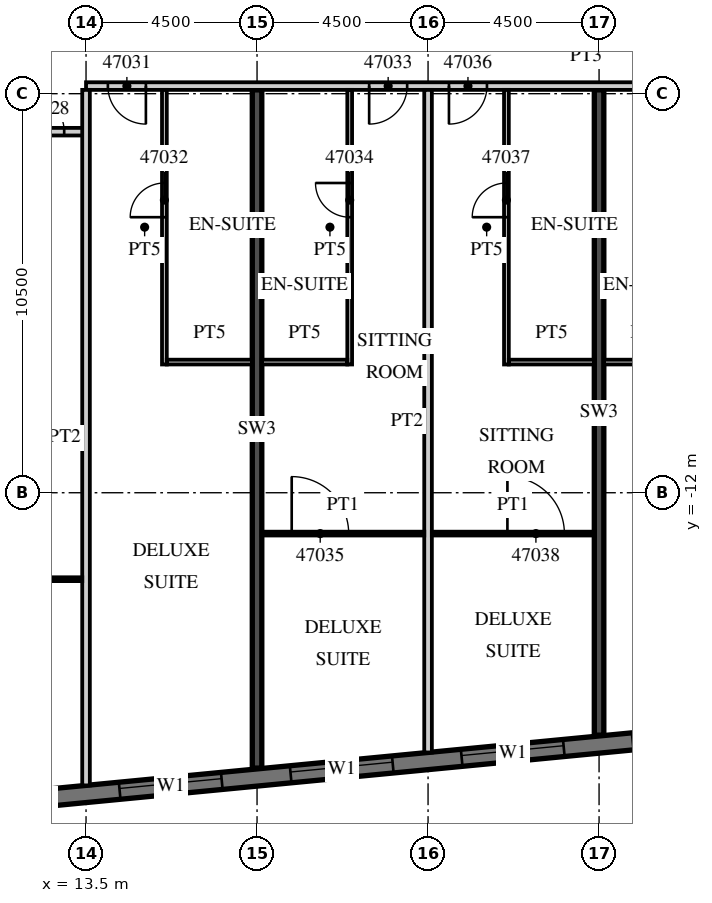
"""IFC4 building model, lengths in metres.
Left out: names, types, materials, properties, quantities, classifications, styles, units other than length and angle.
Written with IfcOpenShell. Run it as: python <this file> out.ifc"""

import sys

from ifc_helpers import new_model, si_unit, direction, frame, frame_2d, origin, place, context, subcontext, project, spatial, rectangle, extrude, element, fill, save


model = new_model("IFC4")
c1 = context("Model", 3, precision=1e-05, world=origin(), true_north=direction((0.0, 1.0)))
c2 = subcontext(c1, "Body", "Model", "MODEL_VIEW")
j1 = project(units=[si_unit("LENGTHUNIT", "METRE"), si_unit("PLANEANGLEUNIT", "RADIAN")], contexts=[c1])
p1 = place(None, origin())
s1 = spatial("IfcSite", under=j1, at=p1, CompositionType="ELEMENT")
p2 = place(p1, origin())
s2 = spatial("IfcBuilding", under=s1, at=p2, CompositionType="ELEMENT")
p3 = place(p2, frame((0.0, 0.0, 196.6)))
s3 = spatial("IfcBuildingStorey", under=s2, at=p3, CompositionType="ELEMENT", Elevation=196.6)
p4 = place(p3, frame((18.0, -19.245, 0.0), z_axis=(0.0, 0.0, 1.0), x_axis=(0.0, 1.0, 0.0)))
e1 = element("IfcWall", 1, at=p4, inside=s3, PredefinedType="SHEAR", context=c2, shape_type="SweptSolid", body=[
    extrude(rectangle(XDim=17.845, YDim=0.25, at=frame_2d((8.923, 0.0))), origin(), (0.0, 0.0, 1.0), 3.3),
])
p5 = place(p3, frame((27.0, -18.379, 0.0), z_axis=(0.0, 0.0, 1.0), x_axis=(0.0, 1.0, 0.0)))
e2 = element("IfcWall", 2, at=p5, inside=s3, PredefinedType="SHEAR", context=c2, shape_type="SweptSolid", body=[
    extrude(rectangle(XDim=16.979, YDim=0.25, at=frame_2d((8.489, 0.0))), origin(), (0.0, 0.0, 1.0), 3.3),
])
p6 = place(p3, frame((-13.521, -22.529, 0.0), z_axis=(0.0, 0.0, 1.0), x_axis=(0.995396436651, 0.095843277819, 0.0)))
e3 = element("IfcWall", 3, at=p6, inside=s3, PredefinedType="SOLIDWALL", context=c2, shape_type="SweptSolid", body=[
    extrude(rectangle(XDim=51.578, YDim=0.45, at=frame_2d((25.789, 0.0))), origin(), (0.0, 0.0, 1.0), 3.02),
])
p7 = place(p6, frame((0.91, 0.0, 0.45)))
e4 = element("IfcOpeningElement", 4, at=p7, cuts=e3, PredefinedType="OPENING", context=c2, shape_type="SweptSolid", body=[
    extrude(rectangle(XDim=2.7, YDim=2.25, at=frame_2d((1.35, 1.125))), frame((0.0, 0.235, 0.0), z_axis=(0.0, -1.0, 0.0), x_axis=(1.0, 0.0, 0.0)), (0.0, 0.0, 1.0), 0.47),
])
p8 = place(p6, frame((5.431, 0.0, 0.45)))
e5 = element("IfcOpeningElement", 5, at=p8, cuts=e3, PredefinedType="OPENING", context=c2, shape_type="SweptSolid", body=[
    extrude(rectangle(XDim=2.7, YDim=2.25, at=frame_2d((1.35, 1.125))), frame((0.0, 0.235, 0.0), z_axis=(0.0, -1.0, 0.0), x_axis=(1.0, 0.0, 0.0)), (0.0, 0.0, 1.0), 0.47),
])
p9 = place(p6, frame((9.952, 0.0, 0.45)))
e6 = element("IfcOpeningElement", 6, at=p9, cuts=e3, PredefinedType="OPENING", context=c2, shape_type="SweptSolid", body=[
    extrude(rectangle(XDim=2.7, YDim=2.25, at=frame_2d((1.35, 1.125))), frame((0.0, 0.235, 0.0), z_axis=(0.0, -1.0, 0.0), x_axis=(1.0, 0.0, 0.0)), (0.0, 0.0, 1.0), 0.47),
])
p10 = place(p6, frame((14.473, 0.0, 0.45)))
e7 = element("IfcOpeningElement", 7, at=p10, cuts=e3, PredefinedType="OPENING", context=c2, shape_type="SweptSolid", body=[
    extrude(rectangle(XDim=2.7, YDim=2.25, at=frame_2d((1.35, 1.125))), frame((0.0, 0.235, 0.0), z_axis=(0.0, -1.0, 0.0), x_axis=(1.0, 0.0, 0.0)), (0.0, 0.0, 1.0), 0.47),
])
p11 = place(p6, frame((18.994, 0.0, 0.45)))
e8 = element("IfcOpeningElement", 8, at=p11, cuts=e3, PredefinedType="OPENING", context=c2, shape_type="SweptSolid", body=[
    extrude(rectangle(XDim=2.7, YDim=2.25, at=frame_2d((1.35, 1.125))), frame((0.0, 0.235, 0.0), z_axis=(0.0, -1.0, 0.0), x_axis=(1.0, 0.0, 0.0)), (0.0, 0.0, 1.0), 0.47),
])
p12 = place(p6, frame((23.514, 0.0, 0.45)))
e9 = element("IfcOpeningElement", 9, at=p12, cuts=e3, PredefinedType="OPENING", context=c2, shape_type="SweptSolid", body=[
    extrude(rectangle(XDim=2.7, YDim=2.25, at=frame_2d((1.35, 1.125))), frame((0.0, 0.235, 0.0), z_axis=(0.0, -1.0, 0.0), x_axis=(1.0, 0.0, 0.0)), (0.0, 0.0, 1.0), 0.47),
])
p13 = place(p6, frame((28.035, 0.0, 0.45)))
e10 = element("IfcOpeningElement", 10, at=p13, cuts=e3, PredefinedType="OPENING", context=c2, shape_type="SweptSolid", body=[
    extrude(rectangle(XDim=2.7, YDim=2.25, at=frame_2d((1.35, 1.125))), frame((0.0, 0.235, 0.0), z_axis=(0.0, -1.0, 0.0), x_axis=(1.0, 0.0, 0.0)), (0.0, 0.0, 1.0), 0.47),
])
p14 = place(p6, frame((32.556, 0.0, 0.45)))
e11 = element("IfcOpeningElement", 11, at=p14, cuts=e3, PredefinedType="OPENING", context=c2, shape_type="SweptSolid", body=[
    extrude(rectangle(XDim=2.7, YDim=2.25, at=frame_2d((1.35, 1.125))), frame((0.0, 0.235, 0.0), z_axis=(0.0, -1.0, 0.0), x_axis=(1.0, 0.0, 0.0)), (0.0, 0.0, 1.0), 0.47),
])
p15 = place(p6, frame((37.077, 0.0, 0.45)))
e12 = element("IfcOpeningElement", 12, at=p15, cuts=e3, PredefinedType="OPENING", context=c2, shape_type="SweptSolid", body=[
    extrude(rectangle(XDim=2.7, YDim=2.25, at=frame_2d((1.35, 1.125))), frame((0.0, 0.235, 0.0), z_axis=(0.0, -1.0, 0.0), x_axis=(1.0, 0.0, 0.0)), (0.0, 0.0, 1.0), 0.47),
])
p16 = place(p6, frame((41.598, 0.0, 0.45)))
e13 = element("IfcOpeningElement", 13, at=p16, cuts=e3, PredefinedType="OPENING", context=c2, shape_type="SweptSolid", body=[
    extrude(rectangle(XDim=2.7, YDim=2.25, at=frame_2d((1.35, 1.125))), frame((0.0, 0.235, 0.0), z_axis=(0.0, -1.0, 0.0), x_axis=(1.0, 0.0, 0.0)), (0.0, 0.0, 1.0), 0.47),
])
p17 = place(p6, frame((46.119, 0.0, 0.45)))
e14 = element("IfcOpeningElement", 14, at=p17, cuts=e3, PredefinedType="OPENING", context=c2, shape_type="SweptSolid", body=[
    extrude(rectangle(XDim=2.7, YDim=2.25, at=frame_2d((1.35, 1.125))), frame((0.0, 0.235, 0.0), z_axis=(0.0, -1.0, 0.0), x_axis=(1.0, 0.0, 0.0)), (0.0, 0.0, 1.0), 0.47),
])
p18 = place(p3, frame((-13.5, -2.5, 0.0), z_axis=(0.0, 0.0, 1.0), x_axis=(1.0, 0.0, 0.0)))
e15 = element("IfcWall", 15, at=p18, inside=s3, PredefinedType="PARTITIONING", context=c2, shape_type="SweptSolid", body=[
    extrude(rectangle(XDim=27.0, YDim=0.2, at=frame_2d((13.5, 0.0))), origin(), (0.0, 0.0, 1.0), 3.02),
])
p19 = place(p18, frame((2.925, 0.0, 0.0)))
e16 = element("IfcOpeningElement", 16, at=p19, cuts=e15, PredefinedType="OPENING", context=c2, shape_type="SweptSolid", body=[
    extrude(rectangle(XDim=1.0, YDim=2.1, at=frame_2d((0.5, 1.05))), frame((0.0, 0.11, 0.0), z_axis=(0.0, -1.0, 0.0), x_axis=(1.0, 0.0, 0.0)), (0.0, 0.0, 1.0), 0.22),
])
p20 = place(p18, frame((5.075, 0.0, 0.0)))
e17 = element("IfcOpeningElement", 17, at=p20, cuts=e15, PredefinedType="OPENING", context=c2, shape_type="SweptSolid", body=[
    extrude(rectangle(XDim=1.0, YDim=2.1, at=frame_2d((0.5, 1.05))), frame((0.0, 0.11, 0.0), z_axis=(0.0, -1.0, 0.0), x_axis=(1.0, 0.0, 0.0)), (0.0, 0.0, 1.0), 0.22),
])
p21 = place(p18, frame((11.925, 0.0, 0.0)))
e18 = element("IfcOpeningElement", 18, at=p21, cuts=e15, PredefinedType="OPENING", context=c2, shape_type="SweptSolid", body=[
    extrude(rectangle(XDim=1.0, YDim=2.1, at=frame_2d((0.5, 1.05))), frame((0.0, 0.11, 0.0), z_axis=(0.0, -1.0, 0.0), x_axis=(1.0, 0.0, 0.0)), (0.0, 0.0, 1.0), 0.22),
])
p22 = place(p18, frame((15.938, 0.0, 0.0)))
e19 = element("IfcOpeningElement", 19, at=p22, cuts=e15, PredefinedType="OPENING", context=c2, shape_type="SweptSolid", body=[
    extrude(rectangle(XDim=1.2, YDim=2.1, at=frame_2d((0.6, 1.05))), frame((0.0, 0.11, 0.0), z_axis=(0.0, -1.0, 0.0), x_axis=(1.0, 0.0, 0.0)), (0.0, 0.0, 1.0), 0.22),
])
p23 = place(p18, frame((25.425, 0.0, 0.0)))
e20 = element("IfcOpeningElement", 20, at=p23, cuts=e15, PredefinedType="OPENING", context=c2, shape_type="SweptSolid", body=[
    extrude(rectangle(XDim=1.0, YDim=2.1, at=frame_2d((0.5, 1.05))), frame((0.0, 0.11, 0.0), z_axis=(0.0, -1.0, 0.0), x_axis=(1.0, 0.0, 0.0)), (0.0, 0.0, 1.0), 0.22),
])
p24 = place(p3, frame((13.5, -1.3, 0.0), z_axis=(0.0, 0.0, 1.0), x_axis=(1.0, 0.0, 0.0)))
e21 = element("IfcWall", 21, at=p24, inside=s3, PredefinedType="PARTITIONING", context=c2, shape_type="SweptSolid", body=[
    extrude(rectangle(XDim=26.317, YDim=0.2, at=frame_2d((13.158, 0.0))), origin(), (0.0, 0.0, 1.0), 3.02),
])
p25 = place(p24, frame((0.575, 0.0, 0.0)))
e22 = element("IfcOpeningElement", 22, at=p25, cuts=e21, PredefinedType="OPENING", context=c2, shape_type="SweptSolid", body=[
    extrude(rectangle(XDim=1.0, YDim=2.1, at=frame_2d((0.5, 1.05))), frame((0.0, 0.11, 0.0), z_axis=(0.0, -1.0, 0.0), x_axis=(1.0, 0.0, 0.0)), (0.0, 0.0, 1.0), 0.22),
])
p26 = place(p24, frame((7.45, 0.0, 0.0)))
e23 = element("IfcOpeningElement", 23, at=p26, cuts=e21, PredefinedType="OPENING", context=c2, shape_type="SweptSolid", body=[
    extrude(rectangle(XDim=1.0, YDim=2.1, at=frame_2d((0.5, 1.05))), frame((0.0, 0.11, 0.0), z_axis=(0.0, -1.0, 0.0), x_axis=(1.0, 0.0, 0.0)), (0.0, 0.0, 1.0), 0.22),
])
p27 = place(p24, frame((9.55, 0.0, 0.0)))
e24 = element("IfcOpeningElement", 24, at=p27, cuts=e21, PredefinedType="OPENING", context=c2, shape_type="SweptSolid", body=[
    extrude(rectangle(XDim=1.0, YDim=2.1, at=frame_2d((0.5, 1.05))), frame((0.0, 0.11, 0.0), z_axis=(0.0, -1.0, 0.0), x_axis=(1.0, 0.0, 0.0)), (0.0, 0.0, 1.0), 0.22),
])
p28 = place(p24, frame((16.45, 0.0, 0.0)))
e25 = element("IfcOpeningElement", 25, at=p28, cuts=e21, PredefinedType="OPENING", context=c2, shape_type="SweptSolid", body=[
    extrude(rectangle(XDim=1.0, YDim=2.1, at=frame_2d((0.5, 1.05))), frame((0.0, 0.11, 0.0), z_axis=(0.0, -1.0, 0.0), x_axis=(1.0, 0.0, 0.0)), (0.0, 0.0, 1.0), 0.22),
])
p29 = place(p24, frame((20.925, 0.0, 0.0)))
e26 = element("IfcOpeningElement", 26, at=p29, cuts=e21, PredefinedType="OPENING", context=c2, shape_type="SweptSolid", body=[
    extrude(rectangle(XDim=1.0, YDim=2.1, at=frame_2d((0.5, 1.05))), frame((0.0, 0.11, 0.0), z_axis=(0.0, -1.0, 0.0), x_axis=(1.0, 0.0, 0.0)), (0.0, 0.0, 1.0), 0.22),
])
p30 = place(p24, frame((25.267, 0.0, 0.0)))
e27 = element("IfcOpeningElement", 27, at=p30, cuts=e21, PredefinedType="OPENING", context=c2, shape_type="SweptSolid", body=[
    extrude(rectangle(XDim=0.9, YDim=2.1, at=frame_2d((0.45, 1.05))), frame((0.0, 0.11, 0.0), z_axis=(0.0, -1.0, 0.0), x_axis=(1.0, 0.0, 0.0)), (0.0, 0.0, 1.0), 0.22),
])
p31 = place(p3, frame((13.5, -19.701, 0.0), z_axis=(0.0, 0.0, 1.0), x_axis=(0.0, 1.0, 0.0)))
e28 = element("IfcWall", 28, at=p31, inside=s3, PredefinedType="PARTITIONING", context=c2, shape_type="SweptSolid", body=[
    extrude(rectangle(XDim=18.301, YDim=0.2, at=frame_2d((9.15, 0.0))), origin(), (0.0, 0.0, 1.0), 3.02),
])
p32 = place(p3, frame((9.125, -14.275, 0.0), z_axis=(0.0, 0.0, 1.0), x_axis=(1.0, 0.0, 0.0)))
e29 = element("IfcWall", 29, at=p32, inside=s3, PredefinedType="PARTITIONING", context=c2, shape_type="SweptSolid", body=[
    extrude(rectangle(XDim=4.275, YDim=0.1, at=frame_2d((2.137, 0.0))), origin(), (0.0, 0.0, 1.0), 3.02),
])
p33 = place(p32, frame((1.387, 0.0, 0.0)))
e30 = element("IfcOpeningElement", 30, at=p33, cuts=e29, PredefinedType="OPENING", context=c2, shape_type="SweptSolid", body=[
    extrude(rectangle(XDim=1.5, YDim=2.1, at=frame_2d((0.75, 1.05))), frame((0.0, 0.06, 0.0), z_axis=(0.0, -1.0, 0.0), x_axis=(1.0, 0.0, 0.0)), (0.0, 0.0, 1.0), 0.12),
])
p34 = place(p3, frame((15.562, -8.625, 0.0), z_axis=(0.0, 0.0, 1.0), x_axis=(0.0, 1.0, 0.0)))
e31 = element("IfcWall", 31, at=p34, inside=s3, PredefinedType="PARTITIONING", context=c2, shape_type="SweptSolid", body=[
    extrude(rectangle(XDim=7.225, YDim=0.125, at=frame_2d((3.613, 0.0))), origin(), (0.0, 0.0, 1.0), 3.02),
])
p35 = place(p34, frame((3.875, 0.0, 0.0)))
e32 = element("IfcOpeningElement", 32, at=p35, cuts=e31, PredefinedType="OPENING", context=c2, shape_type="SweptSolid", body=[
    extrude(rectangle(XDim=0.9, YDim=2.1, at=frame_2d((0.45, 1.05))), frame((0.0, 0.073, 0.0), z_axis=(0.0, -1.0, 0.0), x_axis=(1.0, 0.0, 0.0)), (0.0, 0.0, 1.0), 0.145),
])
p36 = place(p3, frame((15.625, -8.562, 0.0), z_axis=(0.0, 0.0, 1.0), x_axis=(1.0, 0.0, 0.0)))
e33 = element("IfcWall", 33, at=p36, inside=s3, PredefinedType="PARTITIONING", context=c2, shape_type="SweptSolid", body=[
    extrude(rectangle(XDim=2.25, YDim=0.125, at=frame_2d((1.125, 0.0))), origin(), (0.0, 0.0, 1.0), 3.02),
])
p37 = place(p3, frame((22.5, -18.834, 0.0), z_axis=(0.0, 0.0, 1.0), x_axis=(0.0, 1.0, 0.0)))
e34 = element("IfcWall", 34, at=p37, inside=s3, PredefinedType="PARTITIONING", context=c2, shape_type="SweptSolid", body=[
    extrude(rectangle(XDim=17.434, YDim=0.2, at=frame_2d((8.717, 0.0))), origin(), (0.0, 0.0, 1.0), 3.02),
])
p38 = place(p3, frame((20.438, -8.625, 0.0), z_axis=(0.0, 0.0, 1.0), x_axis=(0.0, 1.0, 0.0)))
e35 = element("IfcWall", 35, at=p38, inside=s3, PredefinedType="PARTITIONING", context=c2, shape_type="SweptSolid", body=[
    extrude(rectangle(XDim=7.225, YDim=0.125, at=frame_2d((3.613, 0.0))), origin(), (0.0, 0.0, 1.0), 3.02),
])
p39 = place(p38, frame((3.875, 0.0, 0.0)))
e36 = element("IfcOpeningElement", 36, at=p39, cuts=e35, PredefinedType="OPENING", context=c2, shape_type="SweptSolid", body=[
    extrude(rectangle(XDim=0.9, YDim=2.1, at=frame_2d((0.45, 1.05))), frame((0.0, 0.073, 0.0), z_axis=(0.0, -1.0, 0.0), x_axis=(1.0, 0.0, 0.0)), (0.0, 0.0, 1.0), 0.145),
])
p40 = place(p3, frame((18.125, -8.562, 0.0), z_axis=(0.0, 0.0, 1.0), x_axis=(1.0, 0.0, 0.0)))
e37 = element("IfcWall", 37, at=p40, inside=s3, PredefinedType="PARTITIONING", context=c2, shape_type="SweptSolid", body=[
    extrude(rectangle(XDim=2.25, YDim=0.125, at=frame_2d((1.125, 0.0))), origin(), (0.0, 0.0, 1.0), 3.02),
])
p41 = place(p3, frame((18.125, -13.075, 0.0), z_axis=(0.0, 0.0, 1.0), x_axis=(1.0, 0.0, 0.0)))
e38 = element("IfcWall", 38, at=p41, inside=s3, PredefinedType="PARTITIONING", context=c2, shape_type="SweptSolid", body=[
    extrude(rectangle(XDim=4.275, YDim=0.1, at=frame_2d((2.137, 0.0))), origin(), (0.0, 0.0, 1.0), 3.02),
])
p42 = place(p41, frame((0.787, 0.0, 0.0)))
e39 = element("IfcOpeningElement", 39, at=p42, cuts=e38, PredefinedType="OPENING", context=c2, shape_type="SweptSolid", body=[
    extrude(rectangle(XDim=1.5, YDim=2.1, at=frame_2d((0.75, 1.05))), frame((0.0, 0.06, 0.0), z_axis=(0.0, -1.0, 0.0), x_axis=(1.0, 0.0, 0.0)), (0.0, 0.0, 1.0), 0.12),
])
p43 = place(p3, frame((24.562, -8.625, 0.0), z_axis=(0.0, 0.0, 1.0), x_axis=(0.0, 1.0, 0.0)))
e40 = element("IfcWall", 40, at=p43, inside=s3, PredefinedType="PARTITIONING", context=c2, shape_type="SweptSolid", body=[
    extrude(rectangle(XDim=7.225, YDim=0.125, at=frame_2d((3.613, 0.0))), origin(), (0.0, 0.0, 1.0), 3.02),
])
p44 = place(p43, frame((3.875, 0.0, 0.0)))
e41 = element("IfcOpeningElement", 41, at=p44, cuts=e40, PredefinedType="OPENING", context=c2, shape_type="SweptSolid", body=[
    extrude(rectangle(XDim=0.9, YDim=2.1, at=frame_2d((0.45, 1.05))), frame((0.0, 0.073, 0.0), z_axis=(0.0, -1.0, 0.0), x_axis=(1.0, 0.0, 0.0)), (0.0, 0.0, 1.0), 0.145),
])
p45 = place(p3, frame((24.625, -8.562, 0.0), z_axis=(0.0, 0.0, 1.0), x_axis=(1.0, 0.0, 0.0)))
e42 = element("IfcWall", 42, at=p45, inside=s3, PredefinedType="PARTITIONING", context=c2, shape_type="SweptSolid", body=[
    extrude(rectangle(XDim=2.25, YDim=0.125, at=frame_2d((1.125, 0.0))), origin(), (0.0, 0.0, 1.0), 3.02),
])
p46 = place(p3, frame((22.6, -13.075, 0.0), z_axis=(0.0, 0.0, 1.0), x_axis=(1.0, 0.0, 0.0)))
e43 = element("IfcWall", 43, at=p46, inside=s3, PredefinedType="PARTITIONING", context=c2, shape_type="SweptSolid", body=[
    extrude(rectangle(XDim=4.275, YDim=0.1, at=frame_2d((2.137, 0.0))), origin(), (0.0, 0.0, 1.0), 3.02),
])
p47 = place(p46, frame((1.988, 0.0, 0.0)))
e44 = element("IfcOpeningElement", 44, at=p47, cuts=e43, PredefinedType="OPENING", context=c2, shape_type="SweptSolid", body=[
    extrude(rectangle(XDim=1.5, YDim=2.1, at=frame_2d((0.75, 1.05))), frame((0.0, 0.06, 0.0), z_axis=(0.0, -1.0, 0.0), x_axis=(1.0, 0.0, 0.0)), (0.0, 0.0, 1.0), 0.12),
])
p48 = place(p3, frame((27.125, -8.562, 0.0), z_axis=(0.0, 0.0, 1.0), x_axis=(1.0, 0.0, 0.0)))
e45 = element("IfcWall", 45, at=p48, inside=s3, PredefinedType="PARTITIONING", context=c2, shape_type="SweptSolid", body=[
    extrude(rectangle(XDim=2.25, YDim=0.125, at=frame_2d((1.125, 0.0))), origin(), (0.0, 0.0, 1.0), 3.02),
])
p49 = place(p13, origin())
e46 = element("IfcWindow", 46, at=p49, inside=s3, PartitioningType="SINGLE_PANEL", PredefinedType="WINDOW", context=c2, shape_type="SweptSolid", body=[
    extrude(rectangle(XDim=2.7, YDim=2.25, at=frame_2d((1.35, 1.125))), frame((0.0, 0.09, 0.0), z_axis=(0.0, -1.0, 0.0), x_axis=(1.0, 0.0, 0.0)), (0.0, 0.0, 1.0), 0.06),
])
fill(e10, e46)
p50 = place(p14, origin())
e47 = element("IfcWindow", 47, at=p50, inside=s3, PartitioningType="SINGLE_PANEL", PredefinedType="WINDOW", context=c2, shape_type="SweptSolid", body=[
    extrude(rectangle(XDim=2.7, YDim=2.25, at=frame_2d((1.35, 1.125))), frame((0.0, 0.09, 0.0), z_axis=(0.0, -1.0, 0.0), x_axis=(1.0, 0.0, 0.0)), (0.0, 0.0, 1.0), 0.06),
])
fill(e11, e47)
p51 = place(p15, origin())
e48 = element("IfcWindow", 48, at=p51, inside=s3, PartitioningType="SINGLE_PANEL", PredefinedType="WINDOW", context=c2, shape_type="SweptSolid", body=[
    extrude(rectangle(XDim=2.7, YDim=2.25, at=frame_2d((1.35, 1.125))), frame((0.0, 0.09, 0.0), z_axis=(0.0, -1.0, 0.0), x_axis=(1.0, 0.0, 0.0)), (0.0, 0.0, 1.0), 0.06),
])
fill(e12, e48)
p52 = place(p23, origin())
e49 = element("IfcDoor", 49, at=p52, inside=s3, OperationType="SINGLE_SWING_LEFT", PredefinedType="DOOR", context=c2, shape_type="SweptSolid", body=[
    extrude(rectangle(XDim=1.0, YDim=2.1, at=frame_2d((0.5, 1.05))), frame((0.0, 0.025, 0.0), z_axis=(0.0, -1.0, 0.0), x_axis=(1.0, 0.0, 0.0)), (0.0, 0.0, 1.0), 0.05),
])
fill(e20, e49)
p53 = place(p25, origin())
e50 = element("IfcDoor", 50, at=p53, inside=s3, OperationType="SINGLE_SWING_RIGHT", PredefinedType="DOOR", context=c2, shape_type="SweptSolid", body=[
    extrude(rectangle(XDim=1.0, YDim=2.1, at=frame_2d((0.5, 1.05))), frame((0.0, 0.025, 0.0), z_axis=(0.0, -1.0, 0.0), x_axis=(1.0, 0.0, 0.0)), (0.0, 0.0, 1.0), 0.05),
])
fill(e22, e50)
p54 = place(p35, origin())
e51 = element("IfcDoor", 51, at=p54, inside=s3, OperationType="SINGLE_SWING_LEFT", PredefinedType="DOOR", context=c2, shape_type="SweptSolid", body=[
    extrude(rectangle(XDim=0.9, YDim=2.1, at=frame_2d((0.45, 1.05))), frame((0.0, 0.025, 0.0), z_axis=(0.0, -1.0, 0.0), x_axis=(1.0, 0.0, 0.0)), (0.0, 0.0, 1.0), 0.05),
])
fill(e32, e51)
p55 = place(p26, origin())
e52 = element("IfcDoor", 52, at=p55, inside=s3, OperationType="SINGLE_SWING_LEFT", PredefinedType="DOOR", context=c2, shape_type="SweptSolid", body=[
    extrude(rectangle(XDim=1.0, YDim=2.1, at=frame_2d((0.5, 1.05))), frame((0.0, 0.025, 0.0), z_axis=(0.0, -1.0, 0.0), x_axis=(1.0, 0.0, 0.0)), (0.0, 0.0, 1.0), 0.05),
])
fill(e23, e52)
p56 = place(p39, origin())
e53 = element("IfcDoor", 53, at=p56, inside=s3, OperationType="SINGLE_SWING_RIGHT", PredefinedType="DOOR", context=c2, shape_type="SweptSolid", body=[
    extrude(rectangle(XDim=0.9, YDim=2.1, at=frame_2d((0.45, 1.05))), frame((0.0, 0.025, 0.0), z_axis=(0.0, -1.0, 0.0), x_axis=(1.0, 0.0, 0.0)), (0.0, 0.0, 1.0), 0.05),
])
fill(e36, e53)
p57 = place(p42, origin())
e54 = element("IfcDoor", 54, at=p57, inside=s3, OperationType="SINGLE_SWING_LEFT", PredefinedType="DOOR", context=c2, shape_type="SweptSolid", body=[
    extrude(rectangle(XDim=1.5, YDim=2.1, at=frame_2d((0.75, 1.05))), frame((0.0, 0.025, 0.0), z_axis=(0.0, -1.0, 0.0), x_axis=(1.0, 0.0, 0.0)), (0.0, 0.0, 1.0), 0.05),
])
fill(e39, e54)
p58 = place(p27, origin())
e55 = element("IfcDoor", 55, at=p58, inside=s3, OperationType="SINGLE_SWING_LEFT", PredefinedType="DOOR", context=c2, shape_type="SweptSolid", body=[
    extrude(rectangle(XDim=1.0, YDim=2.1, at=frame_2d((0.5, 1.05))), frame((0.0, 0.025, 0.0), z_axis=(0.0, -1.0, 0.0), x_axis=(1.0, 0.0, 0.0)), (0.0, 0.0, 1.0), 0.05),
])
fill(e24, e55)
p59 = place(p44, origin())
e56 = element("IfcDoor", 56, at=p59, inside=s3, OperationType="SINGLE_SWING_LEFT", PredefinedType="DOOR", context=c2, shape_type="SweptSolid", body=[
    extrude(rectangle(XDim=0.9, YDim=2.1, at=frame_2d((0.45, 1.05))), frame((0.0, 0.025, 0.0), z_axis=(0.0, -1.0, 0.0), x_axis=(1.0, 0.0, 0.0)), (0.0, 0.0, 1.0), 0.05),
])
fill(e41, e56)
p60 = place(p47, origin())
e57 = element("IfcDoor", 57, at=p60, inside=s3, OperationType="SINGLE_SWING_LEFT", PredefinedType="DOOR", context=c2, shape_type="SweptSolid", body=[
    extrude(rectangle(XDim=1.5, YDim=2.1, at=frame_2d((0.75, 1.05))), frame((0.0, 0.025, 0.0), z_axis=(0.0, -1.0, 0.0), x_axis=(1.0, 0.0, 0.0)), (0.0, 0.0, 1.0), 0.05),
])
fill(e44, e57)
save(model, sys.argv[1])
